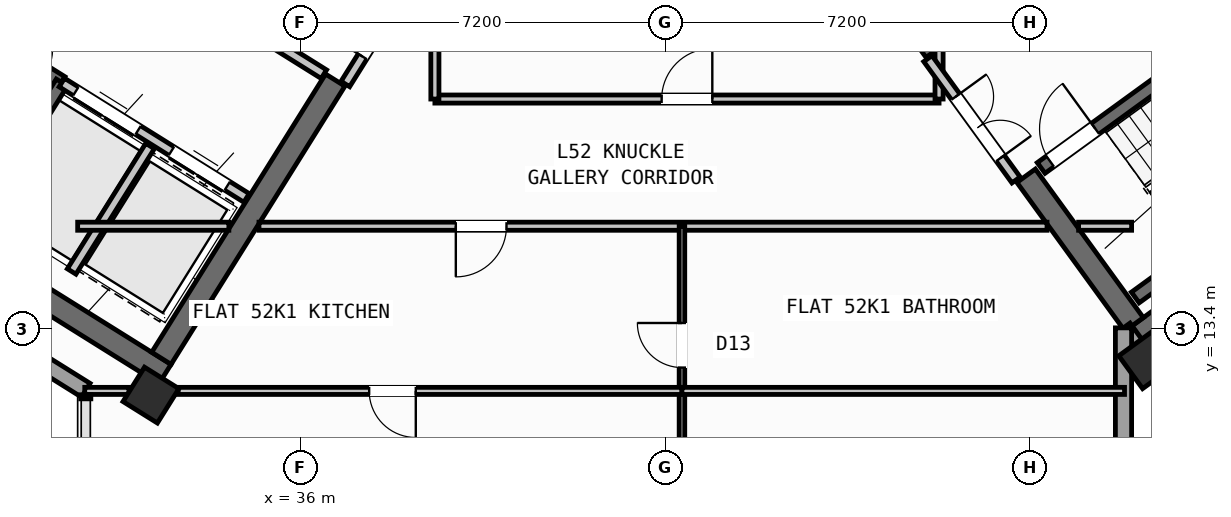
"""IFC4 building model, lengths in metres.
Left out: names, types, materials, properties, quantities, classifications, styles, units other than length and angle.
Written with IfcOpenShell. Run it as: python <this file> out.ifc"""

import sys

from ifc_helpers import new_model, si_unit, direction, frame, frame_2d, origin, origin_2d, place, context, subcontext, project, spatial, rectangle, hollow_rectangle, extrude, source, transform, mapped, element, fill, save


model = new_model("IFC4")
c1 = context("Model", 3, precision=1e-05, world=origin(), true_north=direction((0.0, 1.0)))
c2 = subcontext(c1, "Body", "Model", "MODEL_VIEW")
j1 = project(units=[si_unit("LENGTHUNIT", "METRE"), si_unit("PLANEANGLEUNIT", "RADIAN")], contexts=[c1])
p1 = place(None, origin())
s1 = spatial("IfcSite", under=j1, at=p1, CompositionType="ELEMENT")
p2 = place(p1, origin())
s2 = spatial("IfcBuilding", under=s1, at=p2, CompositionType="ELEMENT")
p3 = place(p2, frame((0.0, 0.0, 207.6)))
s3 = spatial("IfcBuildingStorey", under=s2, at=p3, CompositionType="ELEMENT", Elevation=207.6)
p4 = place(p3, frame((33.324, 12.503, 0.0), z_axis=(0.0, 0.0, 1.0), x_axis=(-0.848043529849, 0.529926571782, 0.0)))
e1 = element("IfcWall", 1, at=p4, inside=s3, PredefinedType="SHEAR", context=c2, shape_type="SweptSolid", body=[
    extrude(rectangle(XDim=13.04, YDim=0.45, at=frame_2d((6.52, 0.0))), origin(), (0.0, 0.0, 1.0), 3.35),
])
p5 = place(p3, frame((36.683, 18.304, 0.0), z_axis=(0.0, 0.0, 1.0), x_axis=(-0.529904039071, -0.848057609704, 0.0)))
e2 = element("IfcWall", 2, at=p5, inside=s3, PredefinedType="SHEAR", context=c2, shape_type="SweptSolid", body=[
    extrude(rectangle(XDim=6.475, YDim=0.45, at=frame_2d((3.238, 0.0))), origin(), (0.0, 0.0, 1.0), 3.35),
])
p6 = place(p3, frame((52.399, 13.169, 0.0), z_axis=(0.0, 0.0, 1.0), x_axis=(0.809022352778, 0.587777877013, 0.0)))
e3 = element("IfcWall", 3, at=p6, inside=s3, PredefinedType="SHEAR", context=c2, shape_type="SweptSolid", body=[
    extrude(rectangle(XDim=12.24, YDim=0.45, at=frame_2d((6.12, 0.0))), origin(), (0.0, 0.0, 1.0), 3.35),
])
p7 = place(p3, frame((52.449, 13.483, 0.0), z_axis=(0.0, 0.0, 1.0), x_axis=(-0.587819244441, 0.808992296542, 0.0)))
e4 = element("IfcWall", 4, at=p7, inside=s3, PredefinedType="SHEAR", context=c2, shape_type="SweptSolid", body=[
    extrude(rectangle(XDim=3.625, YDim=0.45, at=frame_2d((1.812, 0.0))), origin(), (0.0, 0.0, 1.0), 3.35),
])
p8 = place(p3, frame((48.526, 18.884, 0.0), z_axis=(0.0, 0.0, 1.0), x_axis=(-0.587774812919, 0.809024578921, 0.0)))
e5 = element("IfcWall", 5, at=p8, inside=s3, PredefinedType="SHEAR", context=c2, shape_type="SweptSolid", body=[
    extrude(rectangle(XDim=6.475, YDim=0.45, at=frame_2d((3.238, 0.0))), origin(), (0.0, 0.0, 1.0), 3.35),
])
m1 = source(origin(), c2, "Body", "SweptSolid", [
    extrude(hollow_rectangle(XDim=0.8, YDim=0.8, WallThickness=0.032, at=origin_2d()), origin(), (0.0, 0.0, 1.0), 3.6),
])
for number, where, z_axis, x_axis in (
    (6, (33.046, 12.087, 0.0), (0.0, 0.0, 1.0), (-0.848, 0.53, 0.0)),
    (7, (52.705, 12.773, 0.0), (0.0, 0.0, 1.0), (0.809, 0.588, 0.0)),
):
    element("IfcColumn", number, at=place(p3, frame(where, z_axis=z_axis, x_axis=x_axis)), inside=s3, PredefinedType="COLUMN", context=c2, shape_type="MappedRepresentation", body=[
        mapped(m1, transform((0.0, 0.0, 0.0), scale=1.0)),
    ])
p9 = place(p3, frame((31.76, 12.183, 0.0), z_axis=(0.0, 0.0, 1.0), x_axis=(-0.848047074256, 0.529920899612, 0.0)))
e8 = element("IfcWall", 8, at=p9, inside=s3, PredefinedType="STANDARD", context=c2, shape_type="SweptSolid", body=[
    extrude(rectangle(XDim=30.652, YDim=0.32, at=frame_2d((15.326, 0.0))), origin(), (0.0, 0.0, 1.0), 3.35),
])
p10 = place(p9, frame((15.166, 0.0, 0.0)))
e9 = element("IfcOpeningElement", 9, at=p10, cuts=e8, PredefinedType="OPENING", context=c2, shape_type="SweptSolid", body=[
    extrude(rectangle(XDim=1.2, YDim=2.15, at=frame_2d((0.6, 1.075))), frame((0.0, 0.17, 0.0), z_axis=(0.0, -1.0, 0.0), x_axis=(1.0, 0.0, 0.0)), (0.0, 0.0, 1.0), 0.34),
])
p11 = place(p9, frame((2.24, 0.0, 0.9)))
e10 = element("IfcOpeningElement", 10, at=p11, cuts=e8, PredefinedType="OPENING", context=c2, shape_type="SweptSolid", body=[
    extrude(rectangle(XDim=1.65, YDim=1.45, at=frame_2d((0.825, 0.725))), frame((0.0, 0.17, 0.0), z_axis=(0.0, -1.0, 0.0), x_axis=(1.0, 0.0, 0.0)), (0.0, 0.0, 1.0), 0.34),
])
p12 = place(p9, frame((7.469, 0.0, 0.9)))
e11 = element("IfcOpeningElement", 11, at=p12, cuts=e8, PredefinedType="OPENING", context=c2, shape_type="SweptSolid", body=[
    extrude(rectangle(XDim=1.65, YDim=1.45, at=frame_2d((0.825, 0.725))), frame((0.0, 0.17, 0.0), z_axis=(0.0, -1.0, 0.0), x_axis=(1.0, 0.0, 0.0)), (0.0, 0.0, 1.0), 0.34),
])
p13 = place(p9, frame((12.623, 0.0, 1.0)))
e12 = element("IfcOpeningElement", 12, at=p13, cuts=e8, PredefinedType="OPENING", context=c2, shape_type="SweptSolid", body=[
    extrude(rectangle(XDim=0.9, YDim=1.25, at=frame_2d((0.45, 0.625))), frame((0.0, 0.17, 0.0), z_axis=(0.0, -1.0, 0.0), x_axis=(1.0, 0.0, 0.0)), (0.0, 0.0, 1.0), 0.34),
])
p14 = place(p9, frame((19.715, 0.0, 1.0)))
e13 = element("IfcOpeningElement", 13, at=p14, cuts=e8, PredefinedType="OPENING", context=c2, shape_type="SweptSolid", body=[
    extrude(rectangle(XDim=0.9, YDim=1.25, at=frame_2d((0.45, 0.625))), frame((0.0, 0.17, 0.0), z_axis=(0.0, -1.0, 0.0), x_axis=(1.0, 0.0, 0.0)), (0.0, 0.0, 1.0), 0.34),
])
p15 = place(p9, frame((25.566, 0.0, 0.9)))
e14 = element("IfcOpeningElement", 14, at=p15, cuts=e8, PredefinedType="OPENING", context=c2, shape_type="SweptSolid", body=[
    extrude(rectangle(XDim=1.65, YDim=1.45, at=frame_2d((0.825, 0.725))), frame((0.0, 0.17, 0.0), z_axis=(0.0, -1.0, 0.0), x_axis=(1.0, 0.0, 0.0)), (0.0, 0.0, 1.0), 0.34),
])
p16 = place(p9, frame((28.896, 0.0, 1.0)))
e15 = element("IfcOpeningElement", 15, at=p16, cuts=e8, PredefinedType="OPENING", context=c2, shape_type="SweptSolid", body=[
    extrude(rectangle(XDim=0.9, YDim=1.25, at=frame_2d((0.45, 0.625))), frame((0.0, 0.17, 0.0), z_axis=(0.0, -1.0, 0.0), x_axis=(1.0, 0.0, 0.0)), (0.0, 0.0, 1.0), 0.34),
])
p17 = place(p3, frame((52.937, 12.455, 0.0), z_axis=(0.0, 0.0, 1.0), x_axis=(-0.587706324018, 0.809074333241, 0.0)))
e16 = element("IfcWall", 16, at=p17, inside=s3, PredefinedType="STANDARD", context=c2, shape_type="SweptSolid", body=[
    extrude(rectangle(XDim=1.186, YDim=0.32, at=frame_2d((0.593, 0.0))), origin(), (0.0, 0.0, 1.0), 3.35),
])
p18 = place(p3, frame((52.24, 13.414, 0.0), z_axis=(0.0, 0.0, 1.0), x_axis=(0.0, -1.0, 0.0)))
e17 = element("IfcWall", 17, at=p18, inside=s3, PredefinedType="STANDARD", context=c2, shape_type="SweptSolid", body=[
    extrude(rectangle(XDim=9.948, YDim=0.32, at=frame_2d((4.974, 0.0))), origin(), (0.0, 0.0, 1.0), 3.35),
])
p19 = place(p18, frame((3.287, 0.0, 0.9)))
e18 = element("IfcOpeningElement", 18, at=p19, cuts=e17, PredefinedType="OPENING", context=c2, shape_type="SweptSolid", body=[
    extrude(rectangle(XDim=1.65, YDim=1.45, at=frame_2d((0.825, 0.725))), frame((0.0, 0.17, 0.0), z_axis=(0.0, -1.0, 0.0), x_axis=(1.0, 0.0, 0.0)), (0.0, 0.0, 1.0), 0.34),
])
p20 = place(p18, frame((7.808, 0.0, 0.9)))
e19 = element("IfcOpeningElement", 19, at=p20, cuts=e17, PredefinedType="OPENING", context=c2, shape_type="SweptSolid", body=[
    extrude(rectangle(XDim=1.35, YDim=1.45, at=frame_2d((0.675, 0.725))), frame((0.0, 0.17, 0.0), z_axis=(0.0, -1.0, 0.0), x_axis=(1.0, 0.0, 0.0)), (0.0, 0.0, 1.0), 0.34),
])
p21 = place(p3, frame((31.28, 18.261, 0.0), z_axis=(0.0, 0.0, 1.0), x_axis=(-0.848051618787, 0.529913626805, 0.0)))
e20 = element("IfcWall", 20, at=p21, inside=s3, PredefinedType="SHEAR", context=c2, shape_type="SweptSolid", body=[
    extrude(rectangle(XDim=7.46, YDim=0.26, at=frame_2d((3.73, 0.0))), origin(), (0.0, 0.0, 1.0), 3.35),
])
p22 = place(p21, frame((0.36, 0.0, 0.0)))
e21 = element("IfcOpeningElement", 21, at=p22, cuts=e20, PredefinedType="OPENING", context=c2, shape_type="SweptSolid", body=[
    extrude(rectangle(XDim=0.86, YDim=2.05, at=frame_2d((0.43, 1.025))), frame((0.0, 0.14, 0.0), z_axis=(0.0, -1.0, 0.0), x_axis=(1.0, 0.0, 0.0)), (0.0, 0.0, 1.0), 0.28),
])
p23 = place(p3, frame((31.288, 18.256, 0.0), z_axis=(0.0, 0.0, 1.0), x_axis=(-0.529943379326, -0.848033026897, 0.0)))
e22 = element("IfcWall", 22, at=p23, inside=s3, PredefinedType="SHEAR", context=c2, shape_type="SweptSolid", body=[
    extrude(rectangle(XDim=3.16, YDim=0.26, at=frame_2d((1.58, 0.0))), origin(), (0.0, 0.0, 1.0), 3.35),
])
p24 = place(p3, frame((34.933, 15.978, 0.0), z_axis=(0.0, 0.0, 1.0), x_axis=(-0.848055739377, 0.529907032327, 0.0)))
e23 = element("IfcWall", 23, at=p24, inside=s3, PredefinedType="STANDARD", context=c2, shape_type="SweptSolid", body=[
    extrude(rectangle(XDim=4.298, YDim=0.2, at=frame_2d((2.149, 0.0))), origin(), (0.0, 0.0, 1.0), 3.34),
])
p25 = place(p24, frame((0.448, 0.0, 0.0)))
e24 = element("IfcOpeningElement", 24, at=p25, cuts=e23, PredefinedType="OPENING", context=c2, shape_type="SweptSolid", body=[
    extrude(rectangle(XDim=1.3, YDim=2.2, at=frame_2d((0.65, 1.1))), frame((0.0, 0.11, 0.0), z_axis=(0.0, -1.0, 0.0), x_axis=(1.0, 0.0, 0.0)), (0.0, 0.0, 1.0), 0.22),
])
p26 = place(p24, frame((2.523, 0.0, 0.0)))
e25 = element("IfcOpeningElement", 25, at=p26, cuts=e23, PredefinedType="OPENING", context=c2, shape_type="SweptSolid", body=[
    extrude(rectangle(XDim=1.45, YDim=2.25, at=frame_2d((0.725, 1.125))), frame((0.0, 0.11, 0.0), z_axis=(0.0, -1.0, 0.0), x_axis=(1.0, 0.0, 0.0)), (0.0, 0.0, 1.0), 0.22),
])
p27 = place(p3, frame((36.459, 18.421, 0.0), z_axis=(0.0, 0.0, 1.0), x_axis=(-0.848059591691, 0.529900867089, 0.0)))
e26 = element("IfcWall", 26, at=p27, inside=s3, PredefinedType="STANDARD", context=c2, shape_type="SweptSolid", body=[
    extrude(rectangle(XDim=5.818, YDim=0.2, at=frame_2d((2.909, 0.0))), origin(), (0.0, 0.0, 1.0), 3.34),
])
p28 = place(p27, frame((2.598, 0.0, 0.0)))
e27 = element("IfcOpeningElement", 27, at=p28, cuts=e26, PredefinedType="OPENING", context=c2, shape_type="SweptSolid", body=[
    extrude(rectangle(XDim=1.15, YDim=2.1, at=frame_2d((0.575, 1.05))), frame((0.0, 0.11, 0.0), z_axis=(0.0, -1.0, 0.0), x_axis=(1.0, 0.0, 0.0)), (0.0, 0.0, 1.0), 0.22),
])
p29 = place(p3, frame((33.029, 17.003, 0.0), z_axis=(0.0, 0.0, 1.0), x_axis=(-0.529916267533, -0.848049968695, 0.0)))
e28 = element("IfcWall", 28, at=p29, inside=s3, PredefinedType="STANDARD", context=c2, shape_type="SweptSolid", body=[
    extrude(rectangle(XDim=2.92, YDim=0.2, at=frame_2d((1.46, 0.0))), origin(), (0.0, 0.0, 1.0), 3.34),
])
p30 = place(p3, frame((52.472, 14.013, 0.0), z_axis=(0.0, 0.0, 1.0), x_axis=(0.809028366311, 0.587769599847, 0.0)))
e29 = element("IfcWall", 29, at=p30, inside=s3, PredefinedType="SHEAR", context=c2, shape_type="SweptSolid", body=[
    extrude(rectangle(XDim=7.33, YDim=0.26, at=frame_2d((3.665, 0.0))), origin(), (0.0, 0.0, 1.0), 3.35),
])
p31 = place(p3, frame((50.615, 16.57, 0.0), z_axis=(0.0, 0.0, 1.0), x_axis=(0.809028366311, 0.587769599847, 0.0)))
e30 = element("IfcWall", 30, at=p31, inside=s3, PredefinedType="SHEAR", context=c2, shape_type="SweptSolid", body=[
    extrude(rectangle(XDim=7.33, YDim=0.26, at=frame_2d((3.665, 0.0))), origin(), (0.0, 0.0, 1.0), 3.35),
])
p32 = place(p31, frame((0.22, 0.0, 0.0)))
e31 = element("IfcOpeningElement", 31, at=p32, cuts=e30, PredefinedType="OPENING", context=c2, shape_type="SweptSolid", body=[
    extrude(rectangle(XDim=1.1, YDim=2.1, at=frame_2d((0.55, 1.05))), frame((0.0, 0.14, 0.0), z_axis=(0.0, -1.0, 0.0), x_axis=(1.0, 0.0, 0.0)), (0.0, 0.0, 1.0), 0.28),
])
p33 = place(p3, frame((38.451, 20.737, 0.0), z_axis=(0.0, 0.0, 1.0), x_axis=(-0.529924799939, -0.848044637038, 0.0)))
e32 = element("IfcWall", 32, at=p33, inside=s3, PredefinedType="STANDARD", context=c2, shape_type="SweptSolid", body=[
    extrude(rectangle(XDim=2.96, YDim=0.2, at=frame_2d((1.48, 0.0))), origin(), (0.0, 0.0, 1.0), 3.34),
])
p34 = place(p33, frame((1.46, 0.0, 0.0)))
e33 = element("IfcOpeningElement", 33, at=p34, cuts=e32, PredefinedType="OPENING", context=c2, shape_type="SweptSolid", body=[
    extrude(rectangle(XDim=0.86, YDim=2.05, at=frame_2d((0.43, 1.025))), frame((0.0, 0.11, 0.0), z_axis=(0.0, -1.0, 0.0), x_axis=(1.0, 0.0, 0.0)), (0.0, 0.0, 1.0), 0.22),
])
p35 = place(p3, frame((31.6, 15.42, 0.0), z_axis=(0.0, 0.0, 1.0), x_axis=(1.0, 0.0, 0.0)))
e34 = element("IfcWall", 34, at=p35, inside=s3, PredefinedType="PARTITIONING", context=c2, shape_type="SweptSolid", body=[
    extrude(rectangle(XDim=2.984, YDim=0.16, at=frame_2d((1.492, 0.0))), origin(), (0.0, 0.0, 1.0), 3.34),
])
p36 = place(p3, frame((35.178, 15.42, 0.0), z_axis=(0.0, 0.0, 1.0), x_axis=(1.0, 0.0, 0.0)))
e35 = element("IfcWall", 35, at=p36, inside=s3, PredefinedType="PARTITIONING", context=c2, shape_type="SweptSolid", body=[
    extrude(rectangle(XDim=15.552, YDim=0.16, at=frame_2d((7.776, 0.0))), origin(), (0.0, 0.0, 1.0), 3.34),
])
p37 = place(p36, frame((3.885, 0.0, 0.0)))
e36 = element("IfcOpeningElement", 36, at=p37, cuts=e35, PredefinedType="OPENING", context=c2, shape_type="SweptSolid", body=[
    extrude(rectangle(XDim=1.0, YDim=2.1, at=frame_2d((0.5, 1.05))), frame((0.0, 0.09, 0.0), z_axis=(0.0, -1.0, 0.0), x_axis=(1.0, 0.0, 0.0)), (0.0, 0.0, 1.0), 0.18),
])
p38 = place(p3, frame((51.354, 15.42, 0.0), z_axis=(0.0, 0.0, 1.0), x_axis=(1.0, 0.0, 0.0)))
e37 = element("IfcWall", 37, at=p38, inside=s3, PredefinedType="PARTITIONING", context=c2, shape_type="SweptSolid", body=[
    extrude(rectangle(XDim=1.046, YDim=0.16, at=frame_2d((0.523, 0.0))), origin(), (0.0, 0.0, 1.0), 3.34),
])
p39 = place(p3, frame((38.65, 17.93, 0.0), z_axis=(0.0, 0.0, 1.0), x_axis=(1.0, 0.0, 0.0)))
e38 = element("IfcWall", 38, at=p39, inside=s3, PredefinedType="PARTITIONING", context=c2, shape_type="SweptSolid", body=[
    extrude(rectangle(XDim=9.95, YDim=0.16, at=frame_2d((4.975, 0.0))), origin(), (0.0, 0.0, 1.0), 3.34),
])
p40 = place(p39, frame((4.475, 0.0, 0.0)))
e39 = element("IfcOpeningElement", 39, at=p40, cuts=e38, PredefinedType="OPENING", context=c2, shape_type="SweptSolid", body=[
    extrude(rectangle(XDim=1.0, YDim=2.1, at=frame_2d((0.5, 1.05))), frame((0.0, 0.09, 0.0), z_axis=(0.0, -1.0, 0.0), x_axis=(1.0, 0.0, 0.0)), (0.0, 0.0, 1.0), 0.18),
])
p41 = place(p3, frame((38.65, 17.93, 0.0), z_axis=(0.0, 0.0, 1.0), x_axis=(0.0, 1.0, 0.0)))
e40 = element("IfcWall", 40, at=p41, inside=s3, PredefinedType="PARTITIONING", context=c2, shape_type="SweptSolid", body=[
    extrude(rectangle(XDim=3.046, YDim=0.16, at=frame_2d((1.523, 0.0))), origin(), (0.0, 0.0, 1.0), 3.34),
])
p42 = place(p3, frame((48.6, 17.93, 0.0), z_axis=(0.0, 0.0, 1.0), x_axis=(0.0, 1.0, 0.0)))
e41 = element("IfcWall", 41, at=p42, inside=s3, PredefinedType="PARTITIONING", context=c2, shape_type="SweptSolid", body=[
    extrude(rectangle(XDim=0.993, YDim=0.16, at=frame_2d((0.496, 0.0))), origin(), (0.0, 0.0, 1.0), 3.34),
])
p43 = place(p3, frame((50.119, 16.333, 0.0), z_axis=(0.0, 0.0, 1.0), x_axis=(-0.587749856981, 0.809042709391, 0.0)))
e42 = element("IfcWall", 42, at=p43, inside=s3, PredefinedType="STANDARD", context=c2, shape_type="SweptSolid", body=[
    extrude(rectangle(XDim=2.96, YDim=0.2, at=frame_2d((1.48, 0.0))), origin(), (0.0, 0.0, 1.0), 3.34),
])
p44 = place(p43, frame((0.53, 0.0, 0.0)))
e43 = element("IfcOpeningElement", 43, at=p44, cuts=e42, PredefinedType="OPENING", context=c2, shape_type="SweptSolid", body=[
    extrude(rectangle(XDim=1.5, YDim=2.15, at=frame_2d((0.75, 1.075))), frame((0.0, 0.11, 0.0), z_axis=(0.0, -1.0, 0.0), x_axis=(1.0, 0.0, 0.0)), (0.0, 0.0, 1.0), 0.22),
])
p45 = place(p3, frame((43.526, 1.96, 0.0), z_axis=(0.0, 0.0, 1.0), x_axis=(0.0, 1.0, 0.0)))
e44 = element("IfcWall", 44, at=p45, inside=s3, PredefinedType="PARTITIONING", context=c2, shape_type="SweptSolid", body=[
    extrude(rectangle(XDim=13.46, YDim=0.11, at=frame_2d((6.73, 0.0))), origin(), (0.0, 0.0, 1.0), 3.34),
])
p46 = place(p45, frame((5.5, 0.0, 0.0)))
e45 = element("IfcOpeningElement", 45, at=p46, cuts=e44, PredefinedType="OPENING", context=c2, shape_type="SweptSolid", body=[
    extrude(rectangle(XDim=0.92, YDim=2.08, at=frame_2d((0.46, 1.04))), frame((0.0, 0.065, 0.0), z_axis=(0.0, -1.0, 0.0), x_axis=(1.0, 0.0, 0.0)), (0.0, 0.0, 1.0), 0.13),
])
p47 = place(p45, frame((10.67, 0.0, 0.0)))
e46 = element("IfcOpeningElement", 46, at=p47, cuts=e44, PredefinedType="OPENING", context=c2, shape_type="SweptSolid", body=[
    extrude(rectangle(XDim=0.88, YDim=2.08, at=frame_2d((0.44, 1.04))), frame((0.0, 0.065, 0.0), z_axis=(0.0, -1.0, 0.0), x_axis=(1.0, 0.0, 0.0)), (0.0, 0.0, 1.0), 0.13),
])
p48 = place(p3, frame((31.74, 12.17, 0.0), z_axis=(0.0, 0.0, 1.0), x_axis=(1.0, 0.0, 0.0)))
e47 = element("IfcWall", 47, at=p48, inside=s3, PredefinedType="PLUMBINGWALL", context=c2, shape_type="SweptSolid", body=[
    extrude(rectangle(XDim=0.872, YDim=0.14, at=frame_2d((0.436, 0.0))), origin(), (0.0, 0.0, 1.0), 3.34),
])
p49 = place(p3, frame((33.584, 12.17, 0.0), z_axis=(0.0, 0.0, 1.0), x_axis=(1.0, 0.0, 0.0)))
e48 = element("IfcWall", 48, at=p49, inside=s3, PredefinedType="PLUMBINGWALL", context=c2, shape_type="SweptSolid", body=[
    extrude(rectangle(XDim=9.942, YDim=0.14, at=frame_2d((4.971, 0.0))), origin(), (0.0, 0.0, 1.0), 2.525),
])
p50 = place(p49, frame((3.769, 0.0, 0.0)))
e49 = element("IfcOpeningElement", 49, at=p50, cuts=e48, PredefinedType="OPENING", context=c2, shape_type="SweptSolid", body=[
    extrude(rectangle(XDim=0.92, YDim=2.08, at=frame_2d((0.46, 1.04))), frame((0.0, 0.08, 0.0), z_axis=(0.0, -1.0, 0.0), x_axis=(1.0, 0.0, 0.0)), (0.0, 0.0, 1.0), 0.16),
])
p51 = place(p3, frame((43.526, 12.17, 0.0), z_axis=(0.0, 0.0, 1.0), x_axis=(1.0, 0.0, 0.0)))
e50 = element("IfcWall", 50, at=p51, inside=s3, PredefinedType="PLUMBINGWALL", context=c2, shape_type="SweptSolid", body=[
    extrude(rectangle(XDim=8.734, YDim=0.14, at=frame_2d((4.367, 0.0))), origin(), (0.0, 0.0, 1.0), 2.525),
])
m2 = source(origin(), c2, "Body", "SweptSolid", [
    extrude(rectangle(XDim=1.3, YDim=2.2, at=frame_2d((0.65, 1.1))), frame((0.0, 0.025, 0.0), z_axis=(0.0, -1.0, 0.0), x_axis=(1.0, 0.0, 0.0)), (0.0, 0.0, 1.0), 0.05),
])
p52 = place(p25, origin())
e51 = element("IfcDoor", 51, at=p52, inside=s3, OperationType="DOUBLE_DOOR_SLIDING", PredefinedType="DOOR", context=c2, shape_type="MappedRepresentation", body=[
    mapped(m2, transform((0.0, 0.0, 0.0), scale=1.0)),
])
fill(e24, e51)
m3 = source(origin(), c2, "Body", "SweptSolid", [
    extrude(rectangle(XDim=1.45, YDim=2.25, at=frame_2d((0.725, 1.125))), frame((0.0, 0.025, 0.0), z_axis=(0.0, -1.0, 0.0), x_axis=(1.0, 0.0, 0.0)), (0.0, 0.0, 1.0), 0.05),
])
p53 = place(p26, origin())
e52 = element("IfcDoor", 52, at=p53, inside=s3, OperationType="DOUBLE_DOOR_SLIDING", PredefinedType="DOOR", context=c2, shape_type="MappedRepresentation", body=[
    mapped(m3, transform((0.0, 0.0, 0.0), scale=1.0)),
])
fill(e25, e52)
m4 = source(origin(), c2, "Body", "SweptSolid", [
    extrude(rectangle(XDim=1.1, YDim=2.1, at=frame_2d((0.55, 1.05))), frame((0.0, 0.025, 0.0), z_axis=(0.0, -1.0, 0.0), x_axis=(1.0, 0.0, 0.0)), (0.0, 0.0, 1.0), 0.05),
])
p54 = place(p32, origin())
e53 = element("IfcDoor", 53, at=p54, inside=s3, OperationType="SINGLE_SWING_RIGHT", PredefinedType="DOOR", context=c2, shape_type="MappedRepresentation", body=[
    mapped(m4, transform((0.0, 0.0, 0.0), scale=1.0)),
])
fill(e31, e53)
m5 = source(origin(), c2, "Body", "SweptSolid", [
    extrude(rectangle(XDim=1.0, YDim=2.1, at=frame_2d((0.5, 1.05))), frame((0.0, 0.025, 0.0), z_axis=(0.0, -1.0, 0.0), x_axis=(1.0, 0.0, 0.0)), (0.0, 0.0, 1.0), 0.05),
])
p55 = place(p40, origin())
e54 = element("IfcDoor", 54, at=p55, inside=s3, OperationType="SINGLE_SWING_RIGHT", PredefinedType="DOOR", context=c2, shape_type="MappedRepresentation", body=[
    mapped(m5, transform((0.0, 0.0, 0.0), scale=1.0)),
])
fill(e39, e54)
m6 = source(origin(), c2, "Body", "SweptSolid", [
    extrude(rectangle(XDim=0.86, YDim=2.05, at=frame_2d((0.43, 1.025))), frame((0.0, 0.025, 0.0), z_axis=(0.0, -1.0, 0.0), x_axis=(1.0, 0.0, 0.0)), (0.0, 0.0, 1.0), 0.05),
])
p56 = place(p34, frame((0.86, 0.0, 0.0), z_axis=(0.0, 0.0, 1.0), x_axis=(-1.0, 0.0, 0.0)))
e55 = element("IfcDoor", 55, at=p56, inside=s3, OperationType="SINGLE_SWING_LEFT", PredefinedType="DOOR", context=c2, shape_type="MappedRepresentation", body=[
    mapped(m6, transform((0.0, 0.0, 0.0), scale=1.0)),
])
fill(e33, e55)
m7 = source(origin(), c2, "Body", "SweptSolid", [
    extrude(rectangle(XDim=1.5, YDim=2.15, at=frame_2d((0.75, 1.075))), frame((0.0, 0.025, 0.0), z_axis=(0.0, -1.0, 0.0), x_axis=(1.0, 0.0, 0.0)), (0.0, 0.0, 1.0), 0.05),
])
p57 = place(p44, frame((1.5, 0.0, 0.0), z_axis=(0.0, 0.0, 1.0), x_axis=(-1.0, 0.0, 0.0)))
e56 = element("IfcDoor", 56, at=p57, inside=s3, OperationType="DOUBLE_DOOR_SINGLE_SWING", PredefinedType="DOOR", context=c2, shape_type="MappedRepresentation", body=[
    mapped(m7, transform((0.0, 0.0, 0.0), scale=1.0)),
])
fill(e43, e56)
p58 = place(p37, frame((1.0, 0.0, 0.0), z_axis=(0.0, 0.0, 1.0), x_axis=(-1.0, 0.0, 0.0)))
e57 = element("IfcDoor", 57, at=p58, inside=s3, OperationType="SINGLE_SWING_RIGHT", PredefinedType="DOOR", context=c2, shape_type="MappedRepresentation", body=[
    mapped(m5, transform((0.0, 0.0, 0.0), scale=1.0)),
])
fill(e36, e57)
m8 = source(origin(), c2, "Body", "SweptSolid", [
    extrude(rectangle(XDim=0.92, YDim=2.08, at=frame_2d((0.46, 1.04))), frame((0.0, 0.025, 0.0), z_axis=(0.0, -1.0, 0.0), x_axis=(1.0, 0.0, 0.0)), (0.0, 0.0, 1.0), 0.05),
])
p59 = place(p50, frame((0.92, 0.0, 0.0), z_axis=(0.0, 0.0, 1.0), x_axis=(-1.0, 0.0, 0.0)))
e58 = element("IfcDoor", 58, at=p59, inside=s3, OperationType="SINGLE_SWING_LEFT", PredefinedType="DOOR", context=c2, shape_type="MappedRepresentation", body=[
    mapped(m8, transform((0.0, 0.0, 0.0), scale=1.0)),
])
fill(e49, e58)
m9 = source(origin(), c2, "Body", "SweptSolid", [
    extrude(rectangle(XDim=0.88, YDim=2.08, at=frame_2d((0.44, 1.04))), frame((0.0, 0.025, 0.0), z_axis=(0.0, -1.0, 0.0), x_axis=(1.0, 0.0, 0.0)), (0.0, 0.0, 1.0), 0.05),
])
p60 = place(p47, origin())
e59 = element("IfcDoor", 59, at=p60, inside=s3, OperationType="SINGLE_SWING_RIGHT", PredefinedType="DOOR", context=c2, shape_type="MappedRepresentation", body=[
    mapped(m9, transform((0.0, 0.0, 0.0), scale=1.0)),
])
fill(e46, e59)
save(model, sys.argv[1])
